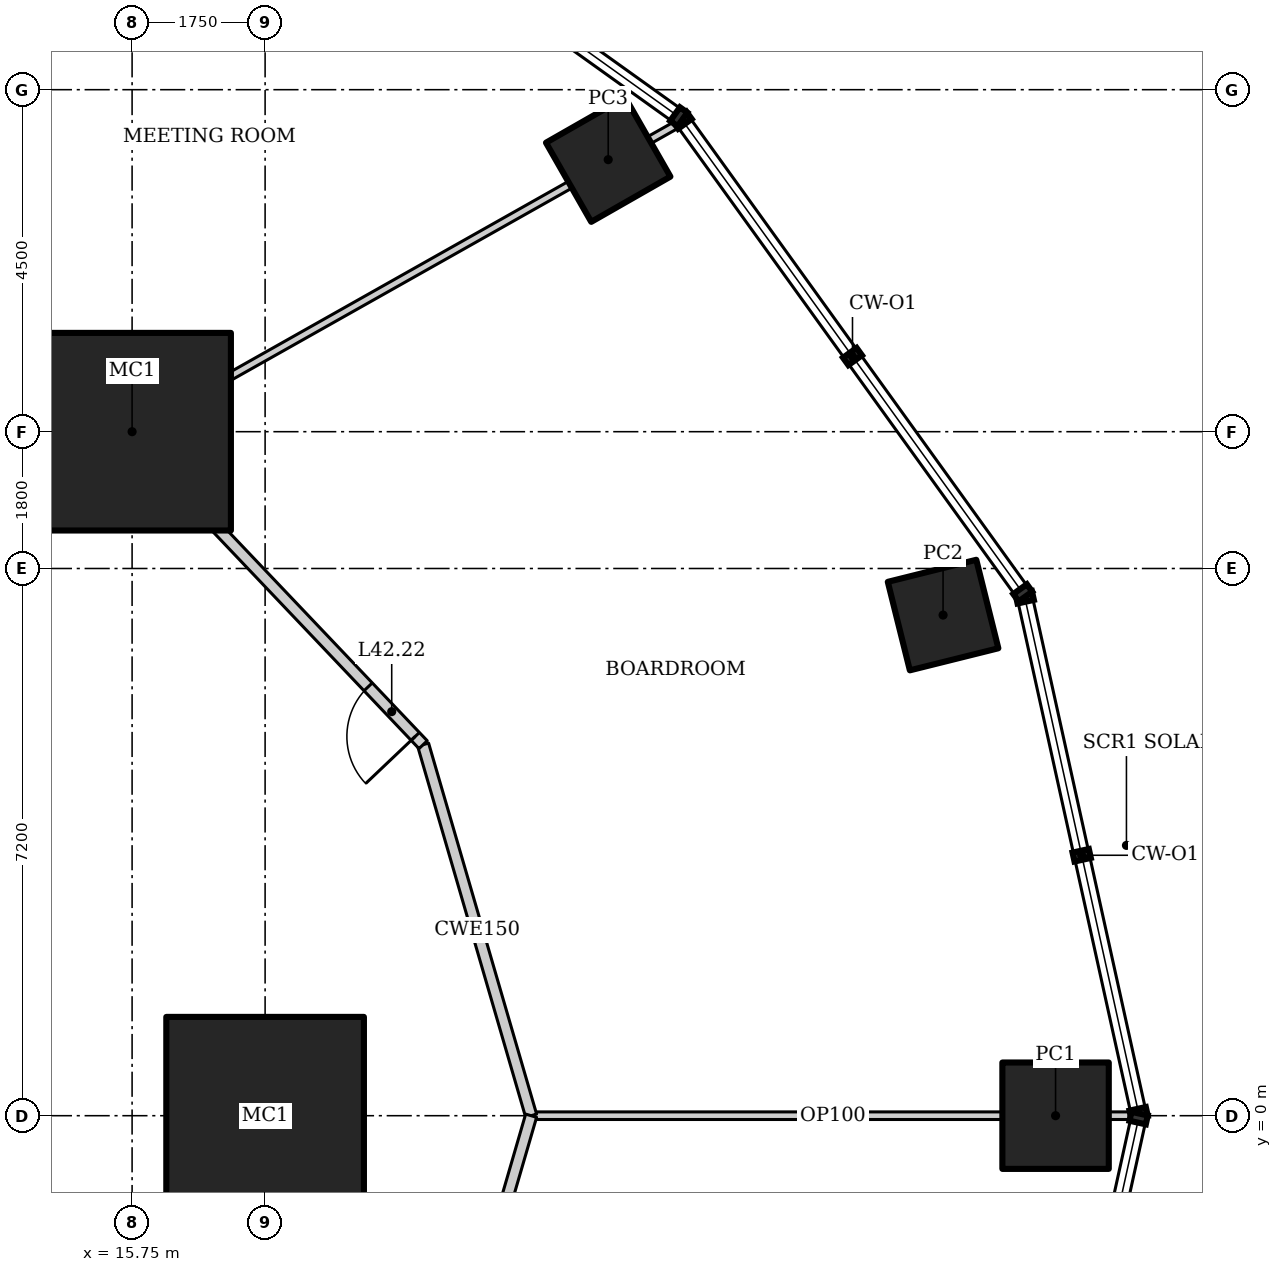
"""IFC4 building model, lengths in metres.
Left out: names, types, materials, properties, quantities, classifications, styles, units other than length and angle.
Written with IfcOpenShell. Run it as: python <this file> out.ifc"""

import sys

from ifc_helpers import new_model, si_unit, direction, frame, frame_2d, origin, origin_2d, place, context, subcontext, project, spatial, rectangle, hollow_rectangle, extrude, element, fill, save


model = new_model("IFC4")
c1 = context("Model", 3, precision=1e-05, world=origin(), true_north=direction((0.0, 1.0)))
c2 = subcontext(c1, "Body", "Model", "MODEL_VIEW")
j1 = project(units=[si_unit("LENGTHUNIT", "METRE"), si_unit("PLANEANGLEUNIT", "RADIAN")], contexts=[c1])
p1 = place(None, origin())
s1 = spatial("IfcSite", under=j1, at=p1, CompositionType="ELEMENT")
p2 = place(p1, origin())
s2 = spatial("IfcBuilding", under=s1, at=p2, CompositionType="ELEMENT")
p3 = place(p2, frame((0.0, 0.0, 180.4)))
s3 = spatial("IfcBuildingStorey", under=s2, at=p3, CompositionType="ELEMENT", Elevation=180.4)
for number, where, z_axis, x_axis in (
    (1, (17.5, 0.0, 0.0), (0.0, 0.0, 1.0), (1.0, 0.0, 0.0)),
    (2, (15.75, 9.0, 0.0), (0.0, 0.0, 1.0), (1.0, 0.0, 0.0)),
):
    element("IfcColumn", number, at=place(p3, frame(where, z_axis=z_axis, x_axis=x_axis)), inside=s3, PredefinedType="COLUMN", context=c2, shape_type="SweptSolid", body=[
        extrude(hollow_rectangle(XDim=2.6, YDim=2.6, WallThickness=0.13, at=origin_2d()), origin(), (0.0, 0.0, 1.0), 4.2),
    ])
p4 = place(p3, frame((27.9, 0.0, 0.0), z_axis=(0.0, 0.0, 1.0), x_axis=(1.0, 0.0, 0.0)))
e3 = element("IfcColumn", 3, at=p4, inside=s3, PredefinedType="COLUMN", context=c2, shape_type="SweptSolid", body=[
    extrude(hollow_rectangle(XDim=1.4, YDim=1.4, WallThickness=0.1, at=origin_2d()), origin(), (0.0, 0.0, 1.0), 4.2),
])
p5 = place(p3, frame((26.42, 6.587, 0.0), z_axis=(0.0, 0.0, 1.0), x_axis=(0.970295726276, 0.2419218956, 0.0)))
e4 = element("IfcColumn", 4, at=p5, inside=s3, PredefinedType="COLUMN", context=c2, shape_type="SweptSolid", body=[
    extrude(hollow_rectangle(XDim=1.2, YDim=1.2, WallThickness=0.1, at=origin_2d()), origin(), (0.0, 0.0, 1.0), 4.2),
])
p6 = place(p3, frame((22.014, 12.579, 0.0), z_axis=(0.0, 0.0, 1.0), x_axis=(0.86824298017, 0.496139221777, 0.0)))
e5 = element("IfcColumn", 5, at=p6, inside=s3, PredefinedType="COLUMN", context=c2, shape_type="SweptSolid", body=[
    extrude(hollow_rectangle(XDim=1.2, YDim=1.2, WallThickness=0.12, at=origin_2d()), origin(), (0.0, 0.0, 1.0), 4.2),
])
p7 = place(p3, frame((28.944, 0.0, 0.0), z_axis=(0.0, 0.0, 1.0), x_axis=(-1.0, 0.0, 0.0)))
e6 = element("IfcWall", 6, at=p7, inside=s3, PredefinedType="PARTITIONING", context=c2, shape_type="SweptSolid", body=[
    extrude(rectangle(XDim=7.944, YDim=0.1, at=frame_2d((3.972, 0.0))), origin(), (0.0, 0.0, 1.0), 3.204),
])
p8 = place(p3, frame((22.949, 13.059, 0.0), z_axis=(0.0, 0.0, 1.0), x_axis=(-0.871079462611, -0.491142107558, 0.0)))
e7 = element("IfcWall", 7, at=p8, inside=s3, PredefinedType="PARTITIONING", context=c2, shape_type="SweptSolid", body=[
    extrude(rectangle(XDim=8.327, YDim=0.1, at=frame_2d((4.164, 0.0))), origin(), (0.0, 0.0, 1.0), 3.451),
])
p9 = place(p3, frame((16.882, 17.414, 0.0), z_axis=(0.0, 0.0, 1.0), x_axis=(-0.698758056249, -0.715358077348, 0.0)))
e8 = element("IfcWall", 8, at=p9, inside=s3, PredefinedType="PARTITIONING", context=c2, shape_type="SweptSolid", body=[
    extrude(rectangle(XDim=8.31, YDim=0.1, at=frame_2d((4.155, 0.0))), origin(), (0.0, 0.0, 1.0), 3.321),
])
p10 = place(p3, frame((21.0, 0.0, 0.0), z_axis=(0.0, 0.0, 1.0), x_axis=(-0.279474430869, 0.960153134917, 0.0)))
e9 = element("IfcWall", 9, at=p10, inside=s3, PredefinedType="PARTITIONING", context=c2, shape_type="SweptSolid", body=[
    extrude(rectangle(XDim=5.084, YDim=0.15, at=frame_2d((2.542, 0.0))), origin(), (0.0, 0.0, 1.0), 4.05),
])
p11 = place(p3, frame((19.579, 4.882, 0.0), z_axis=(0.0, 0.0, 1.0), x_axis=(-0.688797257101, 0.72495402517, 0.0)))
e10 = element("IfcWall", 10, at=p11, inside=s3, PredefinedType="PARTITIONING", context=c2, shape_type="SweptSolid", body=[
    extrude(rectangle(XDim=5.638, YDim=0.15, at=frame_2d((2.819, 0.0))), origin(), (0.0, 0.0, 1.0), 4.05),
])
p12 = place(p11, frame((0.15, 0.0, 0.0)))
e11 = element("IfcOpeningElement", 11, at=p12, cuts=e10, PredefinedType="OPENING", context=c2, shape_type="SweptSolid", body=[
    extrude(rectangle(XDim=0.9, YDim=2.1, at=frame_2d((0.45, 1.05))), frame((0.0, 0.085, 0.0), z_axis=(0.0, -1.0, 0.0), x_axis=(1.0, 0.0, 0.0)), (0.0, 0.0, 1.0), 0.17),
])
p13 = place(p3, frame((15.696, 8.969, 0.0), z_axis=(0.0, 0.0, 1.0), x_axis=(-0.879436285334, 0.476016617397, 0.0)))
e12 = element("IfcWall", 12, at=p13, inside=s3, PredefinedType="PARTITIONING", context=c2, shape_type="SweptSolid", body=[
    extrude(rectangle(XDim=5.253, YDim=0.15, at=frame_2d((2.626, 0.0))), origin(), (0.0, 0.0, 1.0), 4.05),
])
p14 = place(p13, frame((4.203, 0.0, 0.0)))
e13 = element("IfcOpeningElement", 13, at=p14, cuts=e12, PredefinedType="OPENING", context=c2, shape_type="SweptSolid", body=[
    extrude(rectangle(XDim=0.9, YDim=2.1, at=frame_2d((0.45, 1.05))), frame((0.0, 0.085, 0.0), z_axis=(0.0, -1.0, 0.0), x_axis=(1.0, 0.0, 0.0)), (0.0, 0.0, 1.0), 0.17),
])
p15 = place(p3, frame((19.579, -4.882, 0.0), z_axis=(0.0, 0.0, 1.0), x_axis=(0.279474430869, 0.960153134917, 0.0)))
e14 = element("IfcWall", 14, at=p15, inside=s3, PredefinedType="PARTITIONING", context=c2, shape_type="SweptSolid", body=[
    extrude(rectangle(XDim=5.084, YDim=0.15, at=frame_2d((2.542, 0.0))), origin(), (0.0, 0.0, 1.0), 4.05),
])
p16 = place(p12, origin())
e15 = element("IfcDoor", 15, at=p16, inside=s3, OperationType="SINGLE_SWING_LEFT", PredefinedType="DOOR", context=c2, shape_type="SweptSolid", body=[
    extrude(rectangle(XDim=0.9, YDim=2.1, at=frame_2d((0.45, 1.05))), frame((0.0, 0.025, 0.0), z_axis=(0.0, -1.0, 0.0), x_axis=(1.0, 0.0, 0.0)), (0.0, 0.0, 1.0), 0.05),
])
fill(e11, e15)
save(model, sys.argv[1])
